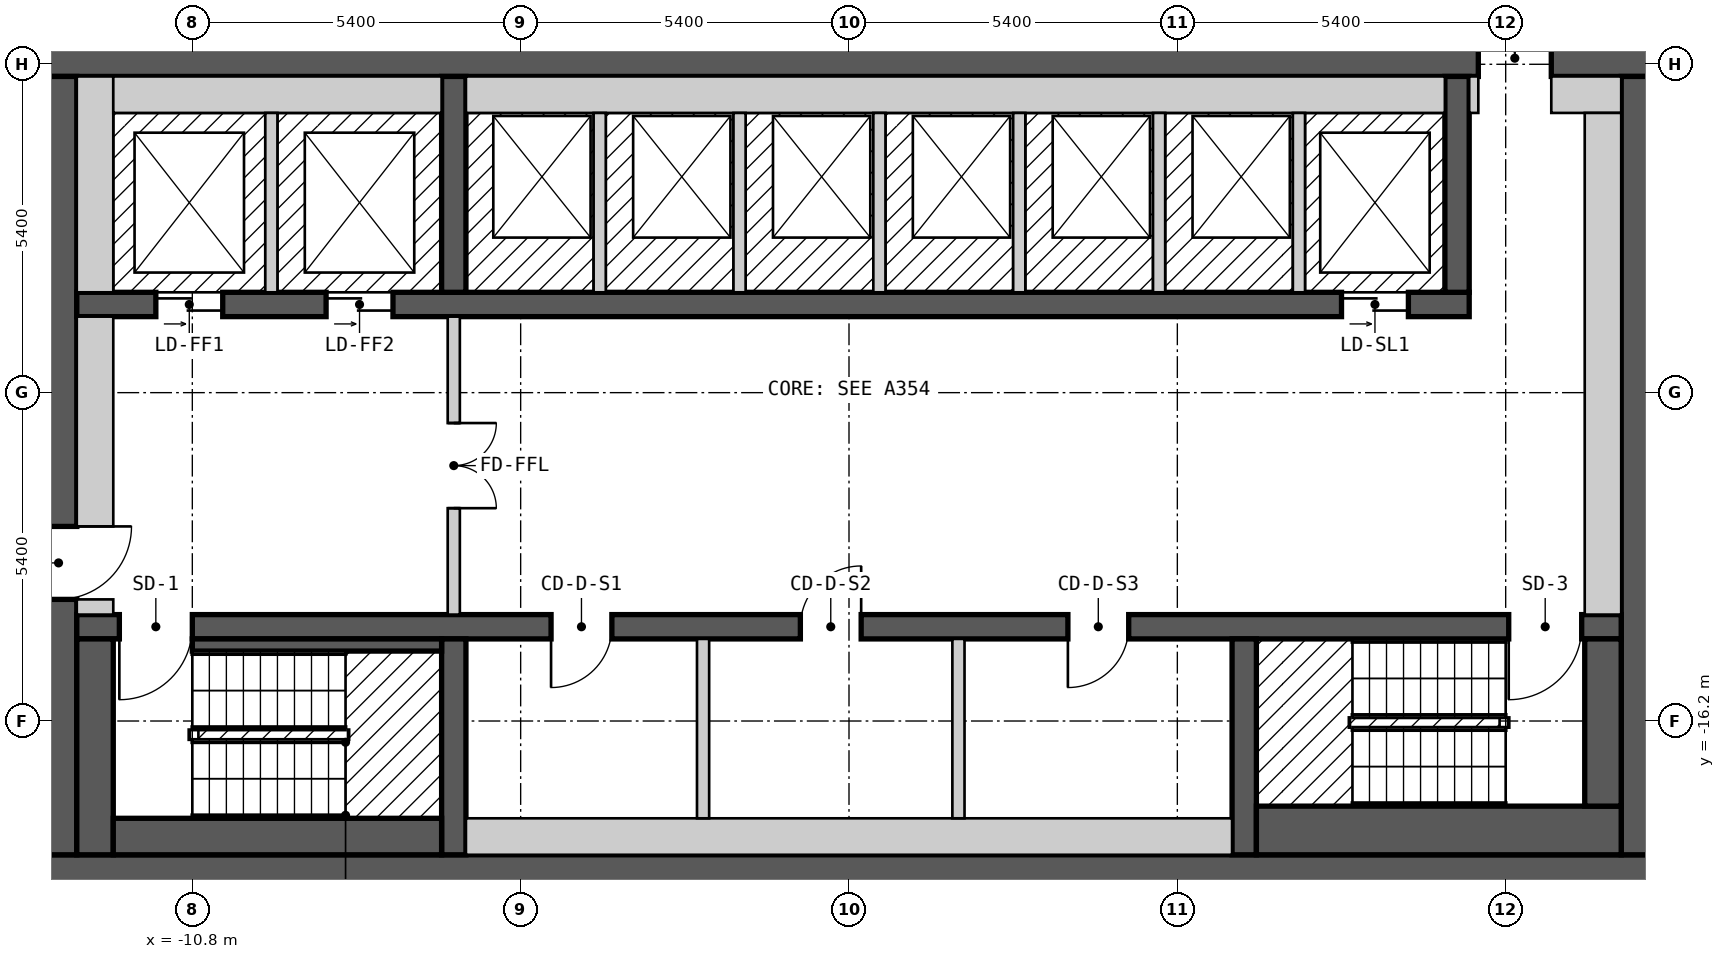
"""IFC4 building model, lengths in metres.
Left out: names, types, materials, properties, quantities, classifications, styles, units other than length and angle.
Written with IfcOpenShell. Run it as: python <this file> out.ifc"""

import sys

from ifc_helpers import new_model, si_unit, direction, frame, frame_2d, origin, place, context, subcontext, project, spatial, rectangle, extrude, element, fill, save


model = new_model("IFC4")
c1 = context("Model", 3, precision=1e-05, world=origin(), true_north=direction((0.0, 1.0)))
c2 = subcontext(c1, "Body", "Model", "MODEL_VIEW")
j1 = project(units=[si_unit("LENGTHUNIT", "METRE"), si_unit("PLANEANGLEUNIT", "RADIAN")], contexts=[c1])
p1 = place(None, origin())
s1 = spatial("IfcSite", under=j1, at=p1, CompositionType="ELEMENT")
p2 = place(p1, origin())
s2 = spatial("IfcBuilding", under=s1, at=p2, CompositionType="ELEMENT")
p3 = place(p2, frame((0.0, 0.0, 199.2)))
s3 = spatial("IfcBuildingStorey", under=s2, at=p3, CompositionType="ELEMENT", Elevation=199.2)
p4 = place(p3, frame((-13.3, -18.7, 0.0), z_axis=(0.0, 0.0, 1.0), x_axis=(1.0, 0.0, 0.0)))
e1 = element("IfcWall", 1, at=p4, inside=s3, PredefinedType="SHEAR", context=c2, shape_type="SweptSolid", body=[
    extrude(rectangle(XDim=26.6, YDim=0.6, at=frame_2d((13.3, 0.0))), origin(), (0.0, 0.0, 1.0), 2.6),
])
p5 = place(p3, frame((-13.3, -5.3, 0.0), z_axis=(0.0, 0.0, 1.0), x_axis=(1.0, 0.0, 0.0)))
e2 = element("IfcWall", 2, at=p5, inside=s3, PredefinedType="SHEAR", context=c2, shape_type="SweptSolid", body=[
    extrude(rectangle(XDim=26.6, YDim=0.6, at=frame_2d((13.3, 0.0))), origin(), (0.0, 0.0, 1.0), 2.6),
])
p6 = place(p5, frame((23.65, 0.0, 0.0)))
e3 = element("IfcOpeningElement", 3, at=p6, cuts=e2, PredefinedType="OPENING", context=c2, shape_type="SweptSolid", body=[
    extrude(rectangle(XDim=1.2, YDim=2.1, at=frame_2d((0.6, 1.05))), frame((0.0, 0.31, 0.0), z_axis=(0.0, -1.0, 0.0), x_axis=(1.0, 0.0, 0.0)), (0.0, 0.0, 1.0), 0.62),
])
p7 = place(p3, frame((-13.0, -18.4, 0.0), z_axis=(0.0, 0.0, 1.0), x_axis=(0.0, 1.0, 0.0)))
e4 = element("IfcWall", 4, at=p7, inside=s3, PredefinedType="SHEAR", context=c2, shape_type="SweptSolid", body=[
    extrude(rectangle(XDim=12.8, YDim=0.6, at=frame_2d((6.4, 0.0))), origin(), (0.0, 0.0, 1.0), 2.6),
])
p8 = place(p7, frame((4.2, 0.0, 0.0)))
e5 = element("IfcOpeningElement", 5, at=p8, cuts=e4, PredefinedType="OPENING", context=c2, shape_type="SweptSolid", body=[
    extrude(rectangle(XDim=1.2, YDim=2.1, at=frame_2d((0.6, 1.05))), frame((0.0, 0.31, 0.0), z_axis=(0.0, -1.0, 0.0), x_axis=(1.0, 0.0, 0.0)), (0.0, 0.0, 1.0), 0.62),
])
p9 = place(p3, frame((13.0, -18.4, 0.0), z_axis=(0.0, 0.0, 1.0), x_axis=(0.0, 1.0, 0.0)))
e6 = element("IfcWall", 6, at=p9, inside=s3, PredefinedType="SHEAR", context=c2, shape_type="SweptSolid", body=[
    extrude(rectangle(XDim=12.8, YDim=0.6, at=frame_2d((6.4, 0.0))), origin(), (0.0, 0.0, 1.0), 2.6),
])
p10 = place(p3, frame((-12.7, -14.65, 0.0), z_axis=(0.0, 0.0, 1.0), x_axis=(1.0, 0.0, 0.0)))
e7 = element("IfcWall", 7, at=p10, inside=s3, PredefinedType="SHEAR", context=c2, shape_type="SweptSolid", body=[
    extrude(rectangle(XDim=25.4, YDim=0.4, at=frame_2d((12.7, 0.0))), origin(), (0.0, 0.0, 1.0), 2.6),
])
p11 = place(p10, frame((1.9, 0.0, 0.0), z_axis=(0.0, 0.0, 1.0), x_axis=(-1.0, 0.0, 0.0)))
e8 = element("IfcOpeningElement", 8, at=p11, cuts=e7, PredefinedType="OPENING", context=c2, shape_type="SweptSolid", body=[
    extrude(rectangle(XDim=1.2, YDim=2.1, at=frame_2d((0.6, 1.05))), frame((0.0, 0.21, 0.0), z_axis=(0.0, -1.0, 0.0), x_axis=(1.0, 0.0, 0.0)), (0.0, 0.0, 1.0), 0.42),
])
p12 = place(p10, frame((24.75, 0.0, 0.0), z_axis=(0.0, 0.0, 1.0), x_axis=(-1.0, 0.0, 0.0)))
e9 = element("IfcOpeningElement", 9, at=p12, cuts=e7, PredefinedType="OPENING", context=c2, shape_type="SweptSolid", body=[
    extrude(rectangle(XDim=1.2, YDim=2.1, at=frame_2d((0.6, 1.05))), frame((0.0, 0.21, 0.0), z_axis=(0.0, -1.0, 0.0), x_axis=(1.0, 0.0, 0.0)), (0.0, 0.0, 1.0), 0.42),
])
p13 = place(p10, frame((8.8, 0.0, 0.0), z_axis=(0.0, 0.0, 1.0), x_axis=(-1.0, 0.0, 0.0)))
e10 = element("IfcOpeningElement", 10, at=p13, cuts=e7, PredefinedType="OPENING", context=c2, shape_type="SweptSolid", body=[
    extrude(rectangle(XDim=1.0, YDim=2.1, at=frame_2d((0.5, 1.05))), frame((0.0, 0.21, 0.0), z_axis=(0.0, -1.0, 0.0), x_axis=(1.0, 0.0, 0.0)), (0.0, 0.0, 1.0), 0.42),
])
p14 = place(p10, frame((12.9, 0.0, 0.0), z_axis=(0.0, 0.0, 1.0), x_axis=(-1.0, 0.0, 0.0)))
e11 = element("IfcOpeningElement", 11, at=p14, cuts=e7, PredefinedType="OPENING", context=c2, shape_type="SweptSolid", body=[
    extrude(rectangle(XDim=1.0, YDim=2.1, at=frame_2d((0.5, 1.05))), frame((0.0, 0.21, 0.0), z_axis=(0.0, -1.0, 0.0), x_axis=(1.0, 0.0, 0.0)), (0.0, 0.0, 1.0), 0.42),
])
p15 = place(p10, frame((17.3, 0.0, 0.0), z_axis=(0.0, 0.0, 1.0), x_axis=(-1.0, 0.0, 0.0)))
e12 = element("IfcOpeningElement", 12, at=p15, cuts=e7, PredefinedType="OPENING", context=c2, shape_type="SweptSolid", body=[
    extrude(rectangle(XDim=1.0, YDim=2.1, at=frame_2d((0.5, 1.05))), frame((0.0, 0.21, 0.0), z_axis=(0.0, -1.0, 0.0), x_axis=(1.0, 0.0, 0.0)), (0.0, 0.0, 1.0), 0.42),
])
p16 = place(p3, frame((-12.7, -9.35, 0.0), z_axis=(0.0, 0.0, 1.0), x_axis=(1.0, 0.0, 0.0)))
e13 = element("IfcWall", 13, at=p16, inside=s3, PredefinedType="SHEAR", context=c2, shape_type="SweptSolid", body=[
    extrude(rectangle(XDim=22.9, YDim=0.4, at=frame_2d((11.45, 0.0))), origin(), (0.0, 0.0, 1.0), 2.6),
])
p17 = place(p16, frame((1.3, 0.0, 0.0)))
e14 = element("IfcOpeningElement", 14, at=p17, cuts=e13, PredefinedType="OPENING", context=c2, shape_type="SweptSolid", body=[
    extrude(rectangle(XDim=1.1, YDim=2.1, at=frame_2d((0.55, 1.05))), frame((0.0, 0.21, 0.0), z_axis=(0.0, -1.0, 0.0), x_axis=(1.0, 0.0, 0.0)), (0.0, 0.0, 1.0), 0.42),
])
p18 = place(p16, frame((4.1, 0.0, 0.0)))
e15 = element("IfcOpeningElement", 15, at=p18, cuts=e13, PredefinedType="OPENING", context=c2, shape_type="SweptSolid", body=[
    extrude(rectangle(XDim=1.1, YDim=2.1, at=frame_2d((0.55, 1.05))), frame((0.0, 0.21, 0.0), z_axis=(0.0, -1.0, 0.0), x_axis=(1.0, 0.0, 0.0)), (0.0, 0.0, 1.0), 0.42),
])
p19 = place(p16, frame((20.8, 0.0, 0.0)))
e16 = element("IfcOpeningElement", 16, at=p19, cuts=e13, PredefinedType="OPENING", context=c2, shape_type="SweptSolid", body=[
    extrude(rectangle(XDim=1.1, YDim=2.1, at=frame_2d((0.55, 1.05))), frame((0.0, 0.21, 0.0), z_axis=(0.0, -1.0, 0.0), x_axis=(1.0, 0.0, 0.0)), (0.0, 0.0, 1.0), 0.42),
])
for number, where, z_axis, x_axis in (
    (17, (-6.5, -18.4, 0.0), (0.0, 0.0, 1.0), (0.0, 1.0, 0.0)),
    (18, (6.5, -18.4, 0.0), (0.0, 0.0, 1.0), (0.0, 1.0, 0.0)),
    (19, (-6.5, -9.15, 0.0), (0.0, 0.0, 1.0), (0.0, 1.0, 0.0)),
    (20, (10.0, -9.15, 0.0), (0.0, 0.0, 1.0), (0.0, 1.0, 0.0)),
):
    element("IfcWall", number, at=place(p3, frame(where, z_axis=z_axis, x_axis=x_axis)), inside=s3, PredefinedType="SHEAR", context=c2, shape_type="SweptSolid", body=[
        extrude(rectangle(XDim=3.55, YDim=0.4, at=frame_2d((1.775, 0.0))), origin(), (0.0, 0.0, 1.0), 2.6),
    ])
p20 = place(p3, frame((-12.4, -18.4, 0.0), z_axis=(0.0, 0.0, 1.0), x_axis=(0.0, 1.0, 0.0)))
e21 = element("IfcWall", 21, at=p20, inside=s3, PredefinedType="SOLIDWALL", context=c2, shape_type="SweptSolid", body=[
    extrude(rectangle(XDim=3.55, YDim=0.6, at=frame_2d((1.775, 0.0))), origin(), (0.0, 0.0, 1.0), 2.6),
])
p21 = place(p3, frame((-12.7, -14.325, 0.0), z_axis=(0.0, 0.0, 1.0), x_axis=(1.0, 0.0, 0.0)))
e22 = element("IfcWall", 22, at=p21, inside=s3, PredefinedType="PARTITIONING", context=c2, shape_type="SweptSolid", body=[
    extrude(rectangle(XDim=0.6, YDim=0.25, at=frame_2d((0.3, 0.0))), origin(), (0.0, 0.0, 1.0), 2.6),
])
p22 = place(p3, frame((-12.4, -13.0, 0.0), z_axis=(0.0, 0.0, 1.0), x_axis=(0.0, 1.0, 0.0)))
e23 = element("IfcWall", 23, at=p22, inside=s3, PredefinedType="PARTITIONING", context=c2, shape_type="SweptSolid", body=[
    extrude(rectangle(XDim=3.45, YDim=0.6, at=frame_2d((1.725, 0.0))), origin(), (0.0, 0.0, 1.0), 2.6),
])
p23 = place(p3, frame((-12.4, -9.15, 0.0), z_axis=(0.0, 0.0, 1.0), x_axis=(0.0, 1.0, 0.0)))
e24 = element("IfcWall", 24, at=p23, inside=s3, PredefinedType="SOLIDWALL", context=c2, shape_type="SweptSolid", body=[
    extrude(rectangle(XDim=3.55, YDim=0.6, at=frame_2d((1.775, 0.0))), origin(), (0.0, 0.0, 1.0), 2.6),
])
for number, where, z_axis, x_axis in (
    (25, (-12.1, -18.1, 0.0), (0.0, 0.0, 1.0), (1.0, 0.0, 0.0)),
    (26, (-12.1, -5.9, 0.0), (0.0, 0.0, 1.0), (1.0, 0.0, 0.0)),
):
    element("IfcWall", number, at=place(p3, frame(where, z_axis=z_axis, x_axis=x_axis)), inside=s3, PredefinedType="SOLIDWALL", context=c2, shape_type="SweptSolid", body=[
        extrude(rectangle(XDim=5.4, YDim=0.6, at=frame_2d((2.7, 0.0))), origin(), (0.0, 0.0, 1.0), 2.6),
    ])
p24 = place(p3, frame((-10.8, -14.95, 0.0), z_axis=(0.0, 0.0, 1.0), x_axis=(1.0, 0.0, 0.0)))
e27 = element("IfcWall", 27, at=p24, inside=s3, PredefinedType="SOLIDWALL", context=c2, shape_type="SweptSolid", body=[
    extrude(rectangle(XDim=4.1, YDim=0.2, at=frame_2d((2.05, 0.0))), origin(), (0.0, 0.0, 1.0), 2.6),
])
p25 = place(p3, frame((-9.5, -9.15, 0.0), z_axis=(0.0, 0.0, 1.0), x_axis=(0.0, 1.0, 0.0)))
e28 = element("IfcWall", 28, at=p25, inside=s3, PredefinedType="SOLIDWALL", context=c2, shape_type="SweptSolid", body=[
    extrude(rectangle(XDim=2.95, YDim=0.2, at=frame_2d((1.475, 0.0))), origin(), (0.0, 0.0, 1.0), 2.6),
])
p26 = place(p3, frame((-6.5, -14.45, 0.0), z_axis=(0.0, 0.0, 1.0), x_axis=(0.0, 1.0, 0.0)))
e29 = element("IfcWall", 29, at=p26, inside=s3, PredefinedType="PARTITIONING", context=c2, shape_type="SweptSolid", body=[
    extrude(rectangle(XDim=4.9, YDim=0.2, at=frame_2d((2.45, 0.0))), origin(), (0.0, 0.0, 1.0), 2.6),
])
p27 = place(p26, frame((3.15, 0.0, 0.0), z_axis=(0.0, 0.0, 1.0), x_axis=(-1.0, 0.0, 0.0)))
e30 = element("IfcOpeningElement", 30, at=p27, cuts=e29, PredefinedType="OPENING", context=c2, shape_type="SweptSolid", body=[
    extrude(rectangle(XDim=1.4, YDim=2.1, at=frame_2d((0.7, 1.05))), frame((0.0, 0.11, 0.0), z_axis=(0.0, -1.0, 0.0), x_axis=(1.0, 0.0, 0.0)), (0.0, 0.0, 1.0), 0.22),
])
p28 = place(p3, frame((-6.3, -18.1, 0.0), z_axis=(0.0, 0.0, 1.0), x_axis=(1.0, 0.0, 0.0)))
e31 = element("IfcWall", 31, at=p28, inside=s3, PredefinedType="PARTITIONING", context=c2, shape_type="SweptSolid", body=[
    extrude(rectangle(XDim=12.6, YDim=0.6, at=frame_2d((6.3, 0.0))), origin(), (0.0, 0.0, 1.0), 2.6),
])
p29 = place(p3, frame((-6.3, -5.9, 0.0), z_axis=(0.0, 0.0, 1.0), x_axis=(1.0, 0.0, 0.0)))
e32 = element("IfcWall", 32, at=p29, inside=s3, PredefinedType="SOLIDWALL", context=c2, shape_type="SweptSolid", body=[
    extrude(rectangle(XDim=16.1, YDim=0.6, at=frame_2d((8.05, 0.0))), origin(), (0.0, 0.0, 1.0), 2.6),
])
p30 = place(p3, frame((-4.1, -9.15, 0.0), z_axis=(0.0, 0.0, 1.0), x_axis=(0.0, 1.0, 0.0)))
e33 = element("IfcWall", 33, at=p30, inside=s3, PredefinedType="SOLIDWALL", context=c2, shape_type="SweptSolid", body=[
    extrude(rectangle(XDim=2.95, YDim=0.2, at=frame_2d((1.475, 0.0))), origin(), (0.0, 0.0, 1.0), 2.6),
])
p31 = place(p3, frame((-2.4, -17.8, 0.0), z_axis=(0.0, 0.0, 1.0), x_axis=(0.0, 1.0, 0.0)))
e34 = element("IfcWall", 34, at=p31, inside=s3, PredefinedType="PARTITIONING", context=c2, shape_type="SweptSolid", body=[
    extrude(rectangle(XDim=2.95, YDim=0.2, at=frame_2d((1.475, 0.0))), origin(), (0.0, 0.0, 1.0), 2.6),
])
for number, where, z_axis, x_axis in (
    (35, (-1.8, -9.15, 0.0), (0.0, 0.0, 1.0), (0.0, 1.0, 0.0)),
    (36, (0.5, -9.15, 0.0), (0.0, 0.0, 1.0), (0.0, 1.0, 0.0)),
):
    element("IfcWall", number, at=place(p3, frame(where, z_axis=z_axis, x_axis=x_axis)), inside=s3, PredefinedType="SOLIDWALL", context=c2, shape_type="SweptSolid", body=[
        extrude(rectangle(XDim=2.95, YDim=0.2, at=frame_2d((1.475, 0.0))), origin(), (0.0, 0.0, 1.0), 2.6),
    ])
p32 = place(p3, frame((1.8, -17.8, 0.0), z_axis=(0.0, 0.0, 1.0), x_axis=(0.0, 1.0, 0.0)))
e37 = element("IfcWall", 37, at=p32, inside=s3, PredefinedType="PARTITIONING", context=c2, shape_type="SweptSolid", body=[
    extrude(rectangle(XDim=2.95, YDim=0.2, at=frame_2d((1.475, 0.0))), origin(), (0.0, 0.0, 1.0), 2.6),
])
for number, where, z_axis, x_axis in (
    (38, (2.8, -9.15, 0.0), (0.0, 0.0, 1.0), (0.0, 1.0, 0.0)),
    (39, (5.1, -9.15, 0.0), (0.0, 0.0, 1.0), (0.0, 1.0, 0.0)),
):
    element("IfcWall", number, at=place(p3, frame(where, z_axis=z_axis, x_axis=x_axis)), inside=s3, PredefinedType="SOLIDWALL", context=c2, shape_type="SweptSolid", body=[
        extrude(rectangle(XDim=2.95, YDim=0.2, at=frame_2d((1.475, 0.0))), origin(), (0.0, 0.0, 1.0), 2.6),
    ])
p33 = place(p3, frame((6.7, -18.0, 0.0), z_axis=(0.0, 0.0, 1.0), x_axis=(1.0, 0.0, 0.0)))
e40 = element("IfcWall", 40, at=p33, inside=s3, PredefinedType="SOLIDWALL", context=c2, shape_type="SweptSolid", body=[
    extrude(rectangle(XDim=6.0, YDim=0.8, at=frame_2d((3.0, 0.0))), origin(), (0.0, 0.0, 1.0), 2.6),
])
p34 = place(p3, frame((7.4, -9.15, 0.0), z_axis=(0.0, 0.0, 1.0), x_axis=(0.0, 1.0, 0.0)))
e41 = element("IfcWall", 41, at=p34, inside=s3, PredefinedType="SOLIDWALL", context=c2, shape_type="SweptSolid", body=[
    extrude(rectangle(XDim=2.95, YDim=0.2, at=frame_2d((1.475, 0.0))), origin(), (0.0, 0.0, 1.0), 2.6),
])
p35 = place(p3, frame((10.275, -6.2, 0.0), z_axis=(0.0, 0.0, 1.0), x_axis=(0.0, 1.0, 0.0)))
e42 = element("IfcWall", 42, at=p35, inside=s3, PredefinedType="PARTITIONING", context=c2, shape_type="SweptSolid", body=[
    extrude(rectangle(XDim=0.6, YDim=0.15, at=frame_2d((0.3, 0.0))), origin(), (0.0, 0.0, 1.0), 2.6),
])
p36 = place(p3, frame((11.55, -5.9, 0.0), z_axis=(0.0, 0.0, 1.0), x_axis=(1.0, 0.0, 0.0)))
e43 = element("IfcWall", 43, at=p36, inside=s3, PredefinedType="PARTITIONING", context=c2, shape_type="SweptSolid", body=[
    extrude(rectangle(XDim=1.15, YDim=0.6, at=frame_2d((0.575, 0.0))), origin(), (0.0, 0.0, 1.0), 2.6),
])
p37 = place(p3, frame((12.4, -17.6, 0.0), z_axis=(0.0, 0.0, 1.0), x_axis=(0.0, 1.0, 0.0)))
e44 = element("IfcWall", 44, at=p37, inside=s3, PredefinedType="SOLIDWALL", context=c2, shape_type="SweptSolid", body=[
    extrude(rectangle(XDim=2.75, YDim=0.6, at=frame_2d((1.375, 0.0))), origin(), (0.0, 0.0, 1.0), 2.6),
])
p38 = place(p3, frame((12.4, -14.45, 0.0), z_axis=(0.0, 0.0, 1.0), x_axis=(0.0, 1.0, 0.0)))
e45 = element("IfcWall", 45, at=p38, inside=s3, PredefinedType="PARTITIONING", context=c2, shape_type="SweptSolid", body=[
    extrude(rectangle(XDim=8.25, YDim=0.6, at=frame_2d((4.125, 0.0))), origin(), (0.0, 0.0, 1.0), 2.6),
])
p39 = place(p17, origin())
e46 = element("IfcDoor", 46, at=p39, inside=s3, OperationType="DOUBLE_DOOR_SLIDING", PredefinedType="DOOR", context=c2, shape_type="SweptSolid", body=[
    extrude(rectangle(XDim=1.1, YDim=2.1, at=frame_2d((0.55, 1.05))), frame((0.0, 0.025, 0.0), z_axis=(0.0, -1.0, 0.0), x_axis=(1.0, 0.0, 0.0)), (0.0, 0.0, 1.0), 0.05),
])
fill(e14, e46)
p40 = place(p18, origin())
e47 = element("IfcDoor", 47, at=p40, inside=s3, OperationType="DOUBLE_DOOR_SLIDING", PredefinedType="DOOR", context=c2, shape_type="SweptSolid", body=[
    extrude(rectangle(XDim=1.1, YDim=2.1, at=frame_2d((0.55, 1.05))), frame((0.0, 0.025, 0.0), z_axis=(0.0, -1.0, 0.0), x_axis=(1.0, 0.0, 0.0)), (0.0, 0.0, 1.0), 0.05),
])
fill(e15, e47)
p41 = place(p19, origin())
e48 = element("IfcDoor", 48, at=p41, inside=s3, OperationType="DOUBLE_DOOR_SLIDING", PredefinedType="DOOR", context=c2, shape_type="SweptSolid", body=[
    extrude(rectangle(XDim=1.1, YDim=2.1, at=frame_2d((0.55, 1.05))), frame((0.0, 0.025, 0.0), z_axis=(0.0, -1.0, 0.0), x_axis=(1.0, 0.0, 0.0)), (0.0, 0.0, 1.0), 0.05),
])
fill(e16, e48)
p42 = place(p11, origin())
e49 = element("IfcDoor", 49, at=p42, inside=s3, OperationType="SINGLE_SWING_RIGHT", PredefinedType="DOOR", context=c2, shape_type="SweptSolid", body=[
    extrude(rectangle(XDim=1.2, YDim=2.1, at=frame_2d((0.6, 1.05))), frame((0.0, 0.025, 0.0), z_axis=(0.0, -1.0, 0.0), x_axis=(1.0, 0.0, 0.0)), (0.0, 0.0, 1.0), 0.05),
])
fill(e8, e49)
p43 = place(p12, origin())
e50 = element("IfcDoor", 50, at=p43, inside=s3, OperationType="SINGLE_SWING_RIGHT", PredefinedType="DOOR", context=c2, shape_type="SweptSolid", body=[
    extrude(rectangle(XDim=1.2, YDim=2.1, at=frame_2d((0.6, 1.05))), frame((0.0, 0.025, 0.0), z_axis=(0.0, -1.0, 0.0), x_axis=(1.0, 0.0, 0.0)), (0.0, 0.0, 1.0), 0.05),
])
fill(e9, e50)
p44 = place(p8, origin())
e51 = element("IfcDoor", 51, at=p44, inside=s3, OperationType="SINGLE_SWING_RIGHT", PredefinedType="DOOR", context=c2, shape_type="SweptSolid", body=[
    extrude(rectangle(XDim=1.2, YDim=2.1, at=frame_2d((0.6, 1.05))), frame((0.0, 0.025, 0.0), z_axis=(0.0, -1.0, 0.0), x_axis=(1.0, 0.0, 0.0)), (0.0, 0.0, 1.0), 0.05),
])
fill(e5, e51)
p45 = place(p27, origin())
e52 = element("IfcDoor", 52, at=p45, inside=s3, OperationType="DOUBLE_DOOR_SINGLE_SWING", PredefinedType="DOOR", context=c2, shape_type="SweptSolid", body=[
    extrude(rectangle(XDim=1.4, YDim=2.1, at=frame_2d((0.7, 1.05))), frame((0.0, 0.025, 0.0), z_axis=(0.0, -1.0, 0.0), x_axis=(1.0, 0.0, 0.0)), (0.0, 0.0, 1.0), 0.05),
])
fill(e30, e52)
p46 = place(p6, origin())
e53 = element("IfcDoor", 53, at=p46, inside=s3, OperationType="DOUBLE_DOOR_SINGLE_SWING", PredefinedType="DOOR", context=c2, shape_type="SweptSolid", body=[
    extrude(rectangle(XDim=1.2, YDim=2.1, at=frame_2d((0.6, 1.05))), frame((0.0, 0.025, 0.0), z_axis=(0.0, -1.0, 0.0), x_axis=(1.0, 0.0, 0.0)), (0.0, 0.0, 1.0), 0.05),
])
fill(e3, e53)
p47 = place(p13, origin())
e54 = element("IfcDoor", 54, at=p47, inside=s3, OperationType="SINGLE_SWING_RIGHT", PredefinedType="DOOR", context=c2, shape_type="SweptSolid", body=[
    extrude(rectangle(XDim=1.0, YDim=2.1, at=frame_2d((0.5, 1.05))), frame((0.0, 0.025, 0.0), z_axis=(0.0, -1.0, 0.0), x_axis=(1.0, 0.0, 0.0)), (0.0, 0.0, 1.0), 0.05),
])
fill(e10, e54)
p48 = place(p14, origin())
e55 = element("IfcDoor", 55, at=p48, inside=s3, OperationType="SINGLE_SWING_LEFT", PredefinedType="DOOR", context=c2, shape_type="SweptSolid", body=[
    extrude(rectangle(XDim=1.0, YDim=2.1, at=frame_2d((0.5, 1.05))), frame((0.0, 0.025, 0.0), z_axis=(0.0, -1.0, 0.0), x_axis=(1.0, 0.0, 0.0)), (0.0, 0.0, 1.0), 0.05),
])
fill(e11, e55)
p49 = place(p15, origin())
e56 = element("IfcDoor", 56, at=p49, inside=s3, OperationType="SINGLE_SWING_RIGHT", PredefinedType="DOOR", context=c2, shape_type="SweptSolid", body=[
    extrude(rectangle(XDim=1.0, YDim=2.1, at=frame_2d((0.5, 1.05))), frame((0.0, 0.025, 0.0), z_axis=(0.0, -1.0, 0.0), x_axis=(1.0, 0.0, 0.0)), (0.0, 0.0, 1.0), 0.05),
])
fill(e12, e56)
save(model, sys.argv[1])
